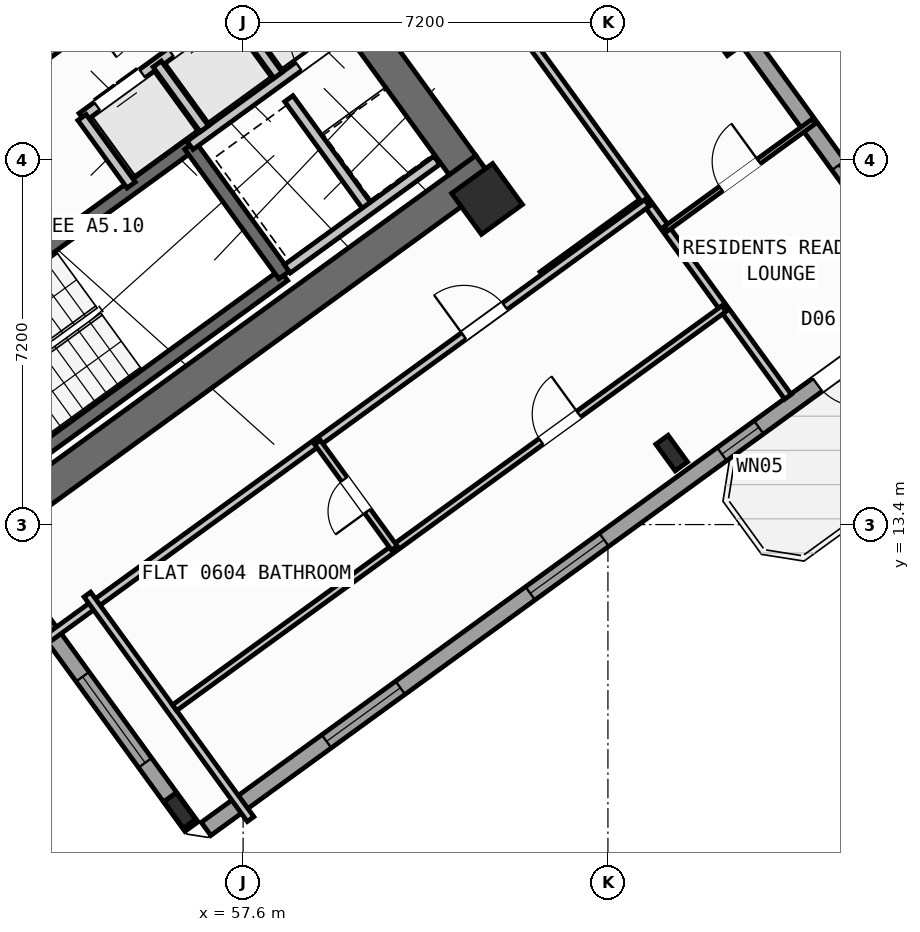
"""IFC4 building model, lengths in metres.
Left out: names, types, materials, properties, quantities, classifications, styles, units other than length and angle.
Written with IfcOpenShell. Run it as: python <this file> out.ifc"""

import sys

from ifc_helpers import new_model, si_unit, direction, frame, frame_2d, origin, origin_2d, place, context, subcontext, project, spatial, rectangle, hollow_rectangle, i_section, extrude, source, transform, mapped, element, fill, save


model = new_model("IFC4")
c1 = context("Model", 3, precision=1e-05, world=origin(), true_north=direction((0.0, 1.0)))
c2 = subcontext(c1, "Body", "Model", "MODEL_VIEW")
j1 = project(units=[si_unit("LENGTHUNIT", "METRE"), si_unit("PLANEANGLEUNIT", "RADIAN")], contexts=[c1])
p1 = place(None, origin())
s1 = spatial("IfcSite", under=j1, at=p1, CompositionType="ELEMENT")
p2 = place(p1, origin())
s2 = spatial("IfcBuilding", under=s1, at=p2, CompositionType="ELEMENT")
p3 = place(p2, frame((0.0, 0.0, 27.6)))
s3 = spatial("IfcBuildingStorey", under=s2, at=p3, CompositionType="ELEMENT", Elevation=27.6)
p4 = place(p3, frame((52.318, 13.11, 0.0), z_axis=(0.0, 0.0, 1.0), x_axis=(0.809019445368, 0.587781878776, 0.0)))
e1 = element("IfcWall", 1, at=p4, inside=s3, PredefinedType="SHEAR", context=c2, shape_type="SweptSolid", body=[
    extrude(rectangle(XDim=12.44, YDim=0.65, at=frame_2d((6.22, 0.0))), origin(), (0.0, 0.0, 1.0), 3.35),
])
p5 = place(p3, frame((61.929, 20.494, 0.0), z_axis=(0.0, 0.0, 1.0), x_axis=(-0.58782982593, 0.808984607855, 0.0)))
e2 = element("IfcWall", 2, at=p5, inside=s3, PredefinedType="SHEAR", context=c2, shape_type="SweptSolid", body=[
    extrude(rectangle(XDim=3.525, YDim=0.65, at=frame_2d((1.762, 0.0))), origin(), (0.0, 0.0, 1.0), 3.35),
])
m1 = source(origin(), c2, "Body", "SweptSolid", [
    extrude(i_section(OverallWidth=0.3, OverallDepth=0.65, WebThickness=0.016, FlangeThickness=0.031, at=origin_2d()), origin(), (0.0, 0.0, 1.0), 3.6),
])
for number, where, z_axis, x_axis in (
    (3, (56.35, 7.758, 0.0), (0.0, 0.0, 1.0), (0.809, 0.588, 0.0)),
    (4, (66.058, 14.811, 0.0), (0.0, 0.0, 1.0), (0.809, 0.588, 0.0)),
):
    element("IfcColumn", number, at=place(p3, frame(where, z_axis=z_axis, x_axis=x_axis)), inside=s3, PredefinedType="COLUMN", context=c2, shape_type="MappedRepresentation", body=[
        mapped(m1, transform((0.0, 0.0, 0.0), scale=1.0)),
    ])
m2 = source(origin(), c2, "Body", "SweptSolid", [
    extrude(hollow_rectangle(XDim=1.0, YDim=1.0, WallThickness=0.04, at=origin_2d()), origin(), (0.0, 0.0, 1.0), 3.6),
])
for number, where, z_axis, x_axis in (
    (5, (62.414, 19.827, 0.0), (0.0, 0.0, 1.0), (0.809, 0.588, 0.0)),
    (6, (67.268, 23.354, 0.0), (0.0, 0.0, 1.0), (0.809, 0.588, 0.0)),
):
    element("IfcColumn", number, at=place(p3, frame(where, z_axis=z_axis, x_axis=x_axis)), inside=s3, PredefinedType="COLUMN", context=c2, shape_type="MappedRepresentation", body=[
        mapped(m2, transform((0.0, 0.0, 0.0), scale=1.0)),
    ])
p6 = place(p3, frame((58.455, 35.484, 0.0), z_axis=(0.0, 0.0, 1.0), x_axis=(0.587783625747, -0.809018176127, 0.0)))
e7 = element("IfcWall", 7, at=p6, inside=s3, PredefinedType="STANDARD", context=c2, shape_type="SweptSolid", body=[
    extrude(rectangle(XDim=21.587, YDim=0.32, at=frame_2d((10.794, 0.0))), origin(), (0.0, 0.0, 1.0), 2.725),
])
p7 = place(p6, frame((2.994, 0.0, 0.8)))
e8 = element("IfcOpeningElement", 8, at=p7, cuts=e7, PredefinedType="OPENING", context=c2, shape_type="SweptSolid", body=[
    extrude(rectangle(XDim=2.1, YDim=1.55, at=frame_2d((1.05, 0.775))), frame((0.0, 0.17, 0.0), z_axis=(0.0, -1.0, 0.0), x_axis=(1.0, 0.0, 0.0)), (0.0, 0.0, 1.0), 0.34),
])
p8 = place(p6, frame((11.934, 0.0, 0.85)))
e9 = element("IfcOpeningElement", 9, at=p8, cuts=e7, PredefinedType="OPENING", context=c2, shape_type="SweptSolid", body=[
    extrude(rectangle(XDim=1.8, YDim=1.5, at=frame_2d((0.9, 0.75))), frame((0.0, 0.17, 0.0), z_axis=(0.0, -1.0, 0.0), x_axis=(1.0, 0.0, 0.0)), (0.0, 0.0, 1.0), 0.34),
])
p9 = place(p6, frame((18.535, 0.0, 0.85)))
e10 = element("IfcOpeningElement", 10, at=p9, cuts=e7, PredefinedType="OPENING", context=c2, shape_type="SweptSolid", body=[
    extrude(rectangle(XDim=1.5, YDim=1.5, at=frame_2d((0.75, 0.75))), frame((0.0, 0.17, 0.0), z_axis=(0.0, -1.0, 0.0), x_axis=(1.0, 0.0, 0.0)), (0.0, 0.0, 1.0), 0.34),
])
p10 = place(p3, frame((71.098, 17.731, 0.0), z_axis=(0.0, 0.0, 1.0), x_axis=(-0.809021120468, -0.587779573171, 0.0)))
e11 = element("IfcWall", 11, at=p10, inside=s3, PredefinedType="STANDARD", context=c2, shape_type="SweptSolid", body=[
    extrude(rectangle(XDim=17.588, YDim=0.32, at=frame_2d((8.794, 0.0))), origin(), (0.0, 0.0, 1.0), 3.35),
])
p11 = place(p10, frame((1.624, 0.0, 0.0)))
e12 = element("IfcOpeningElement", 12, at=p11, cuts=e11, PredefinedType="OPENING", context=c2, shape_type="SweptSolid", body=[
    extrude(rectangle(XDim=1.05, YDim=2.15, at=frame_2d((0.525, 1.075))), frame((0.0, 0.17, 0.0), z_axis=(0.0, -1.0, 0.0), x_axis=(1.0, 0.0, 0.0)), (0.0, 0.0, 1.0), 0.34),
])
p12 = place(p10, frame((4.104, 0.0, 1.0)))
e13 = element("IfcOpeningElement", 13, at=p12, cuts=e11, PredefinedType="OPENING", context=c2, shape_type="SweptSolid", body=[
    extrude(rectangle(XDim=0.9, YDim=1.25, at=frame_2d((0.45, 0.625))), frame((0.0, 0.17, 0.0), z_axis=(0.0, -1.0, 0.0), x_axis=(1.0, 0.0, 0.0)), (0.0, 0.0, 1.0), 0.34),
])
p13 = place(p10, frame((7.879, 0.0, 0.85)))
e14 = element("IfcOpeningElement", 14, at=p13, cuts=e11, PredefinedType="OPENING", context=c2, shape_type="SweptSolid", body=[
    extrude(rectangle(XDim=1.8, YDim=1.5, at=frame_2d((0.9, 0.75))), frame((0.0, 0.17, 0.0), z_axis=(0.0, -1.0, 0.0), x_axis=(1.0, 0.0, 0.0)), (0.0, 0.0, 1.0), 0.34),
])
p14 = place(p10, frame((12.849, 0.0, 0.85)))
e15 = element("IfcOpeningElement", 15, at=p14, cuts=e11, PredefinedType="OPENING", context=c2, shape_type="SweptSolid", body=[
    extrude(rectangle(XDim=1.8, YDim=1.5, at=frame_2d((0.9, 0.75))), frame((0.0, 0.17, 0.0), z_axis=(0.0, -1.0, 0.0), x_axis=(1.0, 0.0, 0.0)), (0.0, 0.0, 1.0), 0.34),
])
p15 = place(p3, frame((56.581, 7.439, 0.0), z_axis=(0.0, 0.0, 1.0), x_axis=(-0.587785875463, 0.809016541614, 0.0)))
e16 = element("IfcWall", 16, at=p15, inside=s3, PredefinedType="STANDARD", context=c2, shape_type="SweptSolid", body=[
    extrude(rectangle(XDim=6.774, YDim=0.32, at=frame_2d((3.387, 0.0))), origin(), (0.0, 0.0, 1.0), 2.725),
])
p16 = place(p15, frame((1.556, 0.0, 0.8)))
e17 = element("IfcOpeningElement", 17, at=p16, cuts=e16, PredefinedType="OPENING", context=c2, shape_type="SweptSolid", body=[
    extrude(rectangle(XDim=2.1, YDim=1.55, at=frame_2d((1.05, 0.775))), frame((0.0, 0.17, 0.0), z_axis=(0.0, -1.0, 0.0), x_axis=(1.0, 0.0, 0.0)), (0.0, 0.0, 1.0), 0.34),
])
p17 = place(p3, frame((52.472, 14.013, 0.0), z_axis=(0.0, 0.0, 1.0), x_axis=(0.809028366311, 0.587769599847, 0.0)))
e18 = element("IfcWall", 18, at=p17, inside=s3, PredefinedType="SHEAR", context=c2, shape_type="SweptSolid", body=[
    extrude(rectangle(XDim=7.33, YDim=0.26, at=frame_2d((3.665, 0.0))), origin(), (0.0, 0.0, 1.0), 3.35),
])
p18 = place(p3, frame((50.615, 16.57, 0.0), z_axis=(0.0, 0.0, 1.0), x_axis=(0.809028366311, 0.587769599847, 0.0)))
e19 = element("IfcWall", 19, at=p18, inside=s3, PredefinedType="SHEAR", context=c2, shape_type="SweptSolid", body=[
    extrude(rectangle(XDim=7.33, YDim=0.26, at=frame_2d((3.665, 0.0))), origin(), (0.0, 0.0, 1.0), 3.35),
])
p19 = place(p18, frame((0.22, 0.0, 0.0)))
e20 = element("IfcOpeningElement", 20, at=p19, cuts=e19, PredefinedType="OPENING", context=c2, shape_type="SweptSolid", body=[
    extrude(rectangle(XDim=1.1, YDim=2.1, at=frame_2d((0.55, 1.05))), frame((0.0, 0.14, 0.0), z_axis=(0.0, -1.0, 0.0), x_axis=(1.0, 0.0, 0.0)), (0.0, 0.0, 1.0), 0.28),
])
p20 = place(p3, frame((58.41, 18.327, 0.0), z_axis=(0.0, 0.0, 1.0), x_axis=(-0.58776738483, 0.809029975545, 0.0)))
e21 = element("IfcWall", 21, at=p20, inside=s3, PredefinedType="SHEAR", context=c2, shape_type="SweptSolid", body=[
    extrude(rectangle(XDim=3.16, YDim=0.26, at=frame_2d((1.58, 0.0))), origin(), (0.0, 0.0, 1.0), 3.35),
])
p21 = place(p3, frame((56.553, 20.884, 0.0), z_axis=(0.0, 0.0, 1.0), x_axis=(0.809035789462, 0.587759382205, 0.0)))
e22 = element("IfcWall", 22, at=p21, inside=s3, PredefinedType="STANDARD", context=c2, shape_type="SweptSolid", body=[
    extrude(rectangle(XDim=3.768, YDim=0.2, at=frame_2d((1.884, 0.0))), origin(), (0.0, 0.0, 1.0), 3.34),
])
p22 = place(p21, frame((2.65, 0.0, 0.0)))
e23 = element("IfcOpeningElement", 23, at=p22, cuts=e22, PredefinedType="OPENING", context=c2, shape_type="SweptSolid", body=[
    extrude(rectangle(XDim=0.86, YDim=2.05, at=frame_2d((0.43, 1.025))), frame((0.0, 0.11, 0.0), z_axis=(0.0, -1.0, 0.0), x_axis=(1.0, 0.0, 0.0)), (0.0, 0.0, 1.0), 0.22),
])
p23 = place(p3, frame((54.421, 21.436, 0.0), z_axis=(0.0, 0.0, 1.0), x_axis=(0.809013710463, 0.587789772183, 0.0)))
e24 = element("IfcWall", 24, at=p23, inside=s3, PredefinedType="STANDARD", context=c2, shape_type="SweptSolid", body=[
    extrude(rectangle(XDim=5.36, YDim=0.2, at=frame_2d((2.68, 0.0))), origin(), (0.0, 0.0, 1.0), 3.34),
])
p24 = place(p23, frame((0.37, 0.0, 0.0)))
e25 = element("IfcOpeningElement", 25, at=p24, cuts=e24, PredefinedType="OPENING", context=c2, shape_type="SweptSolid", body=[
    extrude(rectangle(XDim=1.1, YDim=2.15, at=frame_2d((0.55, 1.075))), frame((0.0, 0.11, 0.0), z_axis=(0.0, -1.0, 0.0), x_axis=(1.0, 0.0, 0.0)), (0.0, 0.0, 1.0), 0.22),
])
p25 = place(p23, frame((2.17, 0.0, 0.0)))
e26 = element("IfcOpeningElement", 26, at=p25, cuts=e24, PredefinedType="OPENING", context=c2, shape_type="SweptSolid", body=[
    extrude(rectangle(XDim=1.1, YDim=2.15, at=frame_2d((0.55, 1.075))), frame((0.0, 0.11, 0.0), z_axis=(0.0, -1.0, 0.0), x_axis=(1.0, 0.0, 0.0)), (0.0, 0.0, 1.0), 0.22),
])
p26 = place(p23, frame((3.97, 0.0, 0.0)))
e27 = element("IfcOpeningElement", 27, at=p26, cuts=e24, PredefinedType="OPENING", context=c2, shape_type="SweptSolid", body=[
    extrude(rectangle(XDim=1.1, YDim=2.15, at=frame_2d((0.55, 1.075))), frame((0.0, 0.11, 0.0), z_axis=(0.0, -1.0, 0.0), x_axis=(1.0, 0.0, 0.0)), (0.0, 0.0, 1.0), 0.22),
])
p27 = place(p3, frame((55.391, 20.102, 0.0), z_axis=(0.0, 0.0, 1.0), x_axis=(-0.58778447739, 0.809017557374, 0.0)))
e28 = element("IfcWall", 28, at=p27, inside=s3, PredefinedType="STANDARD", context=c2, shape_type="SweptSolid", body=[
    extrude(rectangle(XDim=1.65, YDim=0.2, at=frame_2d((0.825, 0.0))), origin(), (0.0, 0.0, 1.0), 3.34),
])
p28 = place(p3, frame((56.834, 21.212, 0.0), z_axis=(0.0, 0.0, 1.0), x_axis=(-0.58776738483, 0.809029975545, 0.0)))
e29 = element("IfcWall", 29, at=p28, inside=s3, PredefinedType="STANDARD", context=c2, shape_type="SweptSolid", body=[
    extrude(rectangle(XDim=1.58, YDim=0.2, at=frame_2d((0.79, 0.0))), origin(), (0.0, 0.0, 1.0), 3.34),
])
p29 = place(p3, frame((58.29, 22.27, 0.0), z_axis=(0.0, 0.0, 1.0), x_axis=(-0.587840865826, 0.808976585857, 0.0)))
e30 = element("IfcWall", 30, at=p29, inside=s3, PredefinedType="STANDARD", context=c2, shape_type="SweptSolid", body=[
    extrude(rectangle(XDim=1.58, YDim=0.2, at=frame_2d((0.79, 0.0))), origin(), (0.0, 0.0, 1.0), 3.34),
])
p30 = place(p3, frame((60.067, 19.655, 0.0), z_axis=(0.0, 0.0, 1.0), x_axis=(-0.587800520745, 0.809005900975, 0.0)))
e31 = element("IfcWall", 31, at=p30, inside=s3, PredefinedType="STANDARD", context=c2, shape_type="SweptSolid", body=[
    extrude(rectangle(XDim=2.66, YDim=0.2, at=frame_2d((1.33, 0.0))), origin(), (0.0, 0.0, 1.0), 3.34),
])
p31 = place(p3, frame((58.472, 18.447, 0.0), z_axis=(0.0, 0.0, 1.0), x_axis=(0.809022487728, 0.587777691266, 0.0)))
e32 = element("IfcWall", 32, at=p31, inside=s3, PredefinedType="STANDARD", context=c2, shape_type="SweptSolid", body=[
    extrude(rectangle(XDim=3.648, YDim=0.2, at=frame_2d((1.824, 0.0))), origin(), (0.0, 0.0, 1.0), 3.34),
])
p32 = place(p3, frame((53.425, 22.468, 0.0), z_axis=(0.0, 0.0, 1.0), x_axis=(0.80902705128, 0.587771409902, 0.0)))
e33 = element("IfcWall", 33, at=p32, inside=s3, PredefinedType="STANDARD", context=c2, shape_type="SweptSolid", body=[
    extrude(rectangle(XDim=5.368, YDim=0.2, at=frame_2d((2.684, 0.0))), origin(), (0.0, 0.0, 1.0), 3.34),
])
p33 = place(p32, frame((4.28, 0.0, 0.0)))
e34 = element("IfcOpeningElement", 34, at=p33, cuts=e33, PredefinedType="OPENING", context=c2, shape_type="SweptSolid", body=[
    extrude(rectangle(XDim=0.86, YDim=2.05, at=frame_2d((0.43, 1.025))), frame((0.0, 0.11, 0.0), z_axis=(0.0, -1.0, 0.0), x_axis=(1.0, 0.0, 0.0)), (0.0, 0.0, 1.0), 0.22),
])
p34 = place(p32, frame((1.45, 0.0, 0.0)))
e35 = element("IfcOpeningElement", 35, at=p34, cuts=e33, PredefinedType="OPENING", context=c2, shape_type="SweptSolid", body=[
    extrude(rectangle(XDim=0.86, YDim=2.05, at=frame_2d((0.43, 1.025))), frame((0.0, 0.11, 0.0), z_axis=(0.0, -1.0, 0.0), x_axis=(1.0, 0.0, 0.0)), (0.0, 0.0, 1.0), 0.22),
])
p35 = place(p3, frame((63.507, 18.322, 0.0), z_axis=(0.0, 0.0, 1.0), x_axis=(0.809034604122, 0.587761013791, 0.0)))
e36 = element("IfcWall", 36, at=p35, inside=s3, PredefinedType="PARTITIONING", context=c2, shape_type="SweptSolid", body=[
    extrude(rectangle(XDim=2.51, YDim=0.16, at=frame_2d((1.255, 0.0))), origin(), (0.0, 0.0, 1.0), 3.34),
])
p36 = place(p3, frame((68.353, 15.922, 0.0), z_axis=(0.0, 0.0, 1.0), x_axis=(-0.587783168305, 0.809018508476, 0.0)))
e37 = element("IfcWall", 37, at=p36, inside=s3, PredefinedType="PARTITIONING", context=c2, shape_type="SweptSolid", body=[
    extrude(rectangle(XDim=10.65, YDim=0.16, at=frame_2d((5.325, 0.0))), origin(), (0.0, 0.0, 1.0), 3.34),
])
p37 = place(p3, frame((65.944, 19.238, 0.0), z_axis=(0.0, 0.0, 1.0), x_axis=(0.809013833588, 0.587789602718, 0.0)))
e38 = element("IfcWall", 38, at=p37, inside=s3, PredefinedType="PARTITIONING", context=c2, shape_type="SweptSolid", body=[
    extrude(rectangle(XDim=3.61, YDim=0.11, at=frame_2d((1.805, 0.0))), origin(), (0.0, 0.0, 1.0), 3.34),
])
p38 = place(p37, frame((1.345, 0.0, 0.0)))
e39 = element("IfcOpeningElement", 39, at=p38, cuts=e38, PredefinedType="OPENING", context=c2, shape_type="SweptSolid", body=[
    extrude(rectangle(XDim=0.92, YDim=2.08, at=frame_2d((0.46, 1.04))), frame((0.0, 0.065, 0.0), z_axis=(0.0, -1.0, 0.0), x_axis=(1.0, 0.0, 0.0)), (0.0, 0.0, 1.0), 0.13),
])
p39 = place(p3, frame((53.705, 11.126, 0.0), z_axis=(0.0, 0.0, 1.0), x_axis=(0.809014504436, 0.587788679384, 0.0)))
e40 = element("IfcWall", 40, at=p39, inside=s3, PredefinedType="PARTITIONING", context=c2, shape_type="SweptSolid", body=[
    extrude(rectangle(XDim=14.67, YDim=0.16, at=frame_2d((7.335, 0.0))), origin(), (0.0, 0.0, 1.0), 3.34),
])
p40 = place(p39, frame((10.2, 0.0, 0.0)))
e41 = element("IfcOpeningElement", 41, at=p40, cuts=e40, PredefinedType="OPENING", context=c2, shape_type="SweptSolid", body=[
    extrude(rectangle(XDim=1.0, YDim=2.1, at=frame_2d((0.5, 1.05))), frame((0.0, 0.09, 0.0), z_axis=(0.0, -1.0, 0.0), x_axis=(1.0, 0.0, 0.0)), (0.0, 0.0, 1.0), 0.18),
])
p41 = place(p3, frame((57.747, 7.586, 0.0), z_axis=(0.0, 0.0, 1.0), x_axis=(-0.587784893399, 0.809017255126, 0.0)))
e42 = element("IfcWall", 42, at=p41, inside=s3, PredefinedType="PARTITIONING", context=c2, shape_type="SweptSolid", body=[
    extrude(rectangle(XDim=5.48, YDim=0.16, at=frame_2d((2.74, 0.0))), origin(), (0.0, 0.0, 1.0), 3.34),
])
p42 = place(p3, frame((56.249, 9.785, 0.0), z_axis=(0.0, 0.0, 1.0), x_axis=(0.809011747655, 0.587792473715, 0.0)))
e43 = element("IfcWall", 43, at=p42, inside=s3, PredefinedType="PLUMBINGWALL", context=c2, shape_type="SweptSolid", body=[
    extrude(rectangle(XDim=13.4, YDim=0.14, at=frame_2d((6.7, 0.0))), origin(), (0.0, 0.0, 1.0), 3.34),
])
p43 = place(p42, frame((8.94, 0.0, 0.0)))
e44 = element("IfcOpeningElement", 44, at=p43, cuts=e43, PredefinedType="OPENING", context=c2, shape_type="SweptSolid", body=[
    extrude(rectangle(XDim=0.92, YDim=2.08, at=frame_2d((0.46, 1.04))), frame((0.0, 0.08, 0.0), z_axis=(0.0, -1.0, 0.0), x_axis=(1.0, 0.0, 0.0)), (0.0, 0.0, 1.0), 0.16),
])
p44 = place(p3, frame((60.585, 12.936, 0.0), z_axis=(0.0, 0.0, 1.0), x_axis=(-0.587772116736, 0.809026537752, 0.0)))
e45 = element("IfcWall", 45, at=p44, inside=s3, PredefinedType="PLUMBINGWALL", context=c2, shape_type="SweptSolid", body=[
    extrude(rectangle(XDim=2.58, YDim=0.14, at=frame_2d((1.29, 0.0))), origin(), (0.0, 0.0, 1.0), 3.34),
])
p45 = place(p44, frame((0.9, 0.0, 0.0)))
e46 = element("IfcOpeningElement", 46, at=p45, cuts=e45, PredefinedType="OPENING", context=c2, shape_type="SweptSolid", body=[
    extrude(rectangle(XDim=0.78, YDim=2.05, at=frame_2d((0.39, 1.025))), frame((0.0, 0.08, 0.0), z_axis=(0.0, -1.0, 0.0), x_axis=(1.0, 0.0, 0.0)), (0.0, 0.0, 1.0), 0.16),
])
m3 = source(origin(), c2, "Body", "SweptSolid", [
    extrude(rectangle(XDim=1.05, YDim=2.15, at=frame_2d((0.525, 1.075))), frame((0.0, 0.025, 0.0), z_axis=(0.0, -1.0, 0.0), x_axis=(1.0, 0.0, 0.0)), (0.0, 0.0, 1.0), 0.05),
])
p46 = place(p11, origin())
e47 = element("IfcDoor", 47, at=p46, inside=s3, OperationType="SINGLE_SWING_LEFT", PredefinedType="DOOR", context=c2, shape_type="MappedRepresentation", body=[
    mapped(m3, transform((0.0, 0.0, 0.0), scale=1.0)),
])
fill(e12, e47)
m4 = source(origin(), c2, "Body", "SweptSolid", [
    extrude(rectangle(XDim=1.5, YDim=1.5, at=frame_2d((0.75, 0.75))), frame((0.0, 0.03, 0.0), z_axis=(0.0, -1.0, 0.0), x_axis=(1.0, 0.0, 0.0)), (0.0, 0.0, 1.0), 0.06),
])
p47 = place(p9, origin())
e48 = element("IfcWindow", 48, at=p47, inside=s3, PartitioningType="SINGLE_PANEL", PredefinedType="WINDOW", context=c2, shape_type="MappedRepresentation", body=[
    mapped(m4, transform((0.0, 0.0, 0.0), scale=1.0)),
])
fill(e10, e48)
m5 = source(origin(), c2, "Body", "SweptSolid", [
    extrude(rectangle(XDim=0.9, YDim=1.25, at=frame_2d((0.45, 0.625))), frame((0.0, 0.03, 0.0), z_axis=(0.0, -1.0, 0.0), x_axis=(1.0, 0.0, 0.0)), (0.0, 0.0, 1.0), 0.06),
])
p48 = place(p12, origin())
e49 = element("IfcWindow", 49, at=p48, inside=s3, PartitioningType="SINGLE_PANEL", PredefinedType="WINDOW", context=c2, shape_type="MappedRepresentation", body=[
    mapped(m5, transform((0.0, 0.0, 0.0), scale=1.0)),
])
fill(e13, e49)
m6 = source(origin(), c2, "Body", "SweptSolid", [
    extrude(rectangle(XDim=1.8, YDim=1.5, at=frame_2d((0.9, 0.75))), frame((0.0, 0.03, 0.0), z_axis=(0.0, -1.0, 0.0), x_axis=(1.0, 0.0, 0.0)), (0.0, 0.0, 1.0), 0.06),
])
p49 = place(p13, origin())
e50 = element("IfcWindow", 50, at=p49, inside=s3, PartitioningType="SINGLE_PANEL", PredefinedType="WINDOW", context=c2, shape_type="MappedRepresentation", body=[
    mapped(m6, transform((0.0, 0.0, 0.0), scale=1.0)),
])
fill(e14, e50)
p50 = place(p14, origin())
e51 = element("IfcWindow", 51, at=p50, inside=s3, PartitioningType="SINGLE_PANEL", PredefinedType="WINDOW", context=c2, shape_type="MappedRepresentation", body=[
    mapped(m6, transform((0.0, 0.0, 0.0), scale=1.0)),
])
fill(e15, e51)
m7 = source(origin(), c2, "Body", "SweptSolid", [
    extrude(rectangle(XDim=2.1, YDim=1.55, at=frame_2d((1.05, 0.775))), frame((0.0, 0.03, 0.0), z_axis=(0.0, -1.0, 0.0), x_axis=(1.0, 0.0, 0.0)), (0.0, 0.0, 1.0), 0.06),
])
p51 = place(p16, origin())
e52 = element("IfcWindow", 52, at=p51, inside=s3, PartitioningType="SINGLE_PANEL", PredefinedType="WINDOW", context=c2, shape_type="MappedRepresentation", body=[
    mapped(m7, transform((0.0, 0.0, 0.0), scale=1.0)),
])
fill(e17, e52)
m8 = source(origin(), c2, "Body", "SweptSolid", [
    extrude(rectangle(XDim=1.1, YDim=2.15, at=frame_2d((0.55, 1.075))), frame((0.0, 0.025, 0.0), z_axis=(0.0, -1.0, 0.0), x_axis=(1.0, 0.0, 0.0)), (0.0, 0.0, 1.0), 0.05),
])
p52 = place(p24, origin())
e53 = element("IfcDoor", 53, at=p52, inside=s3, OperationType="DOUBLE_DOOR_SLIDING", PredefinedType="DOOR", context=c2, shape_type="MappedRepresentation", body=[
    mapped(m8, transform((0.0, 0.0, 0.0), scale=1.0)),
])
fill(e25, e53)
p53 = place(p25, origin())
e54 = element("IfcDoor", 54, at=p53, inside=s3, OperationType="DOUBLE_DOOR_SLIDING", PredefinedType="DOOR", context=c2, shape_type="MappedRepresentation", body=[
    mapped(m8, transform((0.0, 0.0, 0.0), scale=1.0)),
])
fill(e26, e54)
m9 = source(origin(), c2, "Body", "SweptSolid", [
    extrude(rectangle(XDim=0.86, YDim=2.05, at=frame_2d((0.43, 1.025))), frame((0.0, 0.025, 0.0), z_axis=(0.0, -1.0, 0.0), x_axis=(1.0, 0.0, 0.0)), (0.0, 0.0, 1.0), 0.05),
])
p54 = place(p22, origin())
e55 = element("IfcDoor", 55, at=p54, inside=s3, OperationType="SINGLE_SWING_RIGHT", PredefinedType="DOOR", context=c2, shape_type="MappedRepresentation", body=[
    mapped(m9, transform((0.0, 0.0, 0.0), scale=1.0)),
])
fill(e23, e55)
m10 = source(origin(), c2, "Body", "SweptSolid", [
    extrude(rectangle(XDim=0.92, YDim=2.08, at=frame_2d((0.46, 1.04))), frame((0.0, 0.025, 0.0), z_axis=(0.0, -1.0, 0.0), x_axis=(1.0, 0.0, 0.0)), (0.0, 0.0, 1.0), 0.05),
])
p55 = place(p38, origin())
e56 = element("IfcDoor", 56, at=p55, inside=s3, OperationType="SINGLE_SWING_RIGHT", PredefinedType="DOOR", context=c2, shape_type="MappedRepresentation", body=[
    mapped(m10, transform((0.0, 0.0, 0.0), scale=1.0)),
])
fill(e39, e56)
m11 = source(origin(), c2, "Body", "SweptSolid", [
    extrude(rectangle(XDim=1.0, YDim=2.1, at=frame_2d((0.5, 1.05))), frame((0.0, 0.025, 0.0), z_axis=(0.0, -1.0, 0.0), x_axis=(1.0, 0.0, 0.0)), (0.0, 0.0, 1.0), 0.05),
])
p56 = place(p40, origin())
e57 = element("IfcDoor", 57, at=p56, inside=s3, OperationType="SINGLE_SWING_LEFT", PredefinedType="DOOR", context=c2, shape_type="MappedRepresentation", body=[
    mapped(m11, transform((0.0, 0.0, 0.0), scale=1.0)),
])
fill(e41, e57)
p57 = place(p43, origin())
e58 = element("IfcDoor", 58, at=p57, inside=s3, OperationType="SINGLE_SWING_RIGHT", PredefinedType="DOOR", context=c2, shape_type="MappedRepresentation", body=[
    mapped(m10, transform((0.0, 0.0, 0.0), scale=1.0)),
])
fill(e44, e58)
m12 = source(origin(), c2, "Body", "SweptSolid", [
    extrude(rectangle(XDim=0.78, YDim=2.05, at=frame_2d((0.39, 1.025))), frame((0.0, 0.025, 0.0), z_axis=(0.0, -1.0, 0.0), x_axis=(1.0, 0.0, 0.0)), (0.0, 0.0, 1.0), 0.05),
])
p58 = place(p45, origin())
e59 = element("IfcDoor", 59, at=p58, inside=s3, OperationType="SINGLE_SWING_LEFT", PredefinedType="DOOR", context=c2, shape_type="MappedRepresentation", body=[
    mapped(m12, transform((0.0, 0.0, 0.0), scale=1.0)),
])
fill(e46, e59)
save(model, sys.argv[1])
